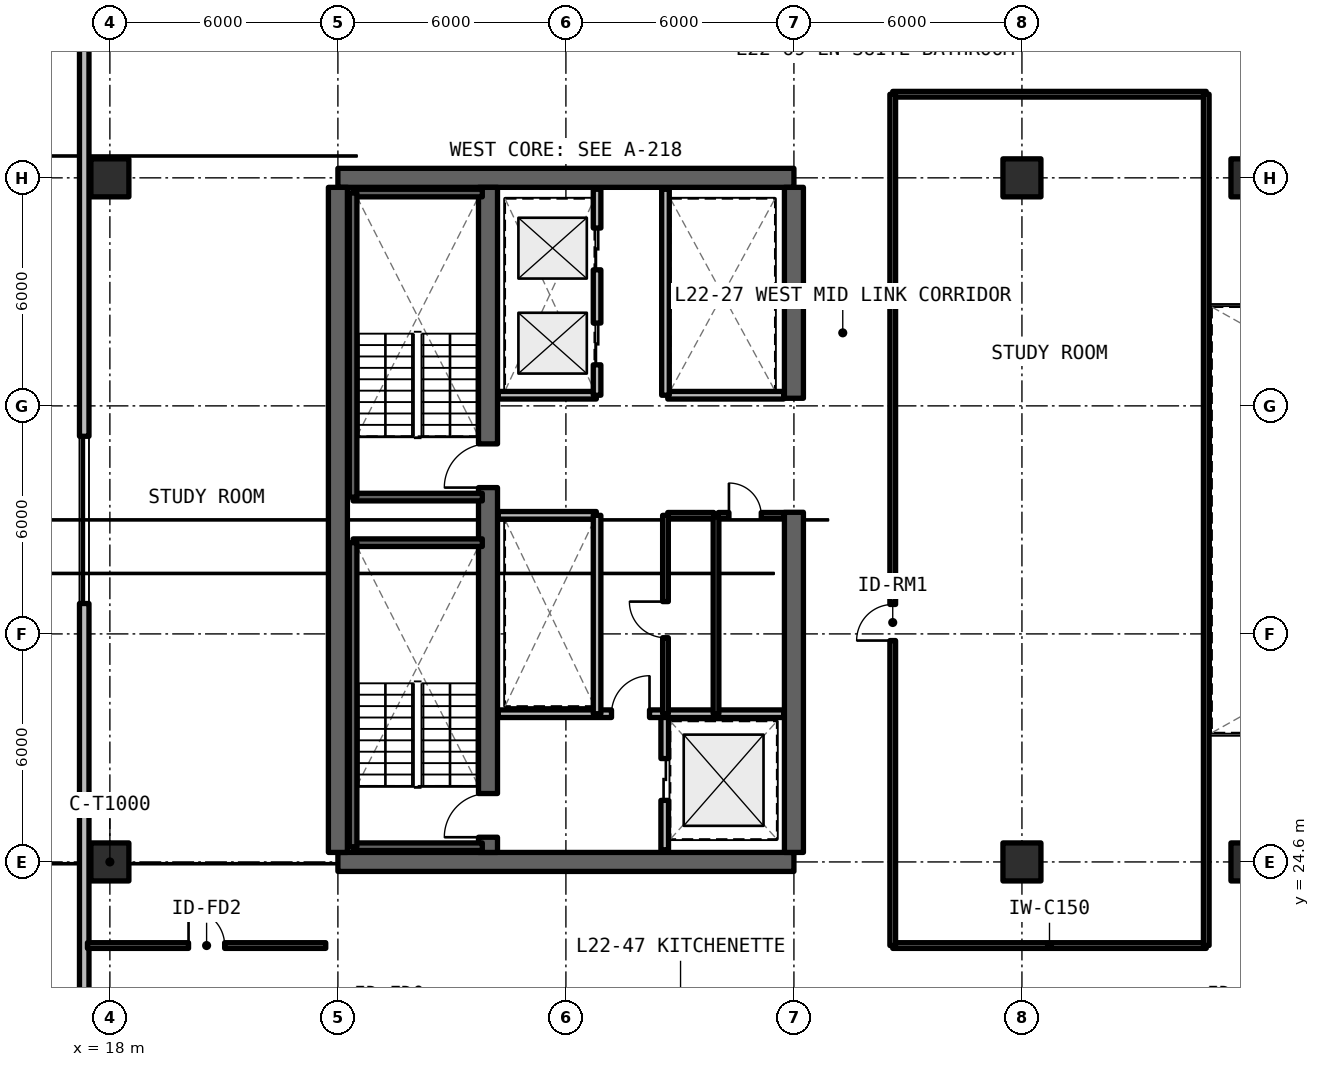
"""IFC4 building model, lengths in metres.
Left out: names, types, materials, properties, quantities, classifications, styles, units other than length and angle.
Written with IfcOpenShell. Run it as: python <this file> out.ifc"""

import sys

from ifc_helpers import new_model, si_unit, direction, frame, frame_2d, origin, origin_2d, place, context, subcontext, project, spatial, rectangle, extrude, element, fill, save


model = new_model("IFC4")
c1 = context("Model", 3, precision=1e-05, world=origin(), true_north=direction((0.0, 1.0)))
c2 = subcontext(c1, "Body", "Model", "MODEL_VIEW")
j1 = project(units=[si_unit("LENGTHUNIT", "METRE"), si_unit("PLANEANGLEUNIT", "RADIAN")], contexts=[c1])
p1 = place(None, origin())
s1 = spatial("IfcSite", under=j1, at=p1, CompositionType="ELEMENT")
p2 = place(p1, origin())
s2 = spatial("IfcBuilding", under=s1, at=p2, CompositionType="ELEMENT")
p3 = place(p2, frame((0.0, 0.0, 82.17)))
s3 = spatial("IfcBuildingStorey", under=s2, at=p3, CompositionType="ELEMENT", Elevation=82.17)
for number, where, z_axis, x_axis in (
    (1, (24.0, 24.6, 0.0), (0.0, 0.0, 1.0), (1.0, 0.0, 0.0)),
    (2, (36.0, 42.6, 0.0), (0.0, 0.0, 1.0), (-1.0, 0.0, 0.0)),
):
    element("IfcWall", number, at=place(p3, frame(where, z_axis=z_axis, x_axis=x_axis)), inside=s3, PredefinedType="SHEAR", context=c2, shape_type="SweptSolid", body=[
        extrude(rectangle(XDim=12.0, YDim=0.5, at=frame_2d((6.0, 0.0))), origin(), (0.0, 0.0, 1.0), 3.3),
    ])
p4 = place(p3, frame((24.0, 24.85, 0.0), z_axis=(0.0, 0.0, 1.0), x_axis=(0.0, 1.0, 0.0)))
e3 = element("IfcWall", 3, at=p4, inside=s3, PredefinedType="SHEAR", context=c2, shape_type="SweptSolid", body=[
    extrude(rectangle(XDim=17.5, YDim=0.5, at=frame_2d((8.75, 0.0))), origin(), (0.0, 0.0, 1.0), 3.3),
])
p5 = place(p3, frame((36.0, 24.85, 0.0), z_axis=(0.0, 0.0, 1.0), x_axis=(0.0, 1.0, 0.0)))
e4 = element("IfcWall", 4, at=p5, inside=s3, PredefinedType="SHEAR", context=c2, shape_type="SweptSolid", body=[
    extrude(rectangle(XDim=8.95, YDim=0.5, at=frame_2d((4.475, 0.0))), origin(), (0.0, 0.0, 1.0), 3.3),
])
p6 = place(p3, frame((36.0, 36.8, 0.0), z_axis=(0.0, 0.0, 1.0), x_axis=(0.0, 1.0, 0.0)))
e5 = element("IfcWall", 5, at=p6, inside=s3, PredefinedType="SHEAR", context=c2, shape_type="SweptSolid", body=[
    extrude(rectangle(XDim=5.55, YDim=0.5, at=frame_2d((2.775, 0.0))), origin(), (0.0, 0.0, 1.0), 3.3),
])
p7 = place(p3, frame((27.95, 24.85, 0.0), z_axis=(0.0, 0.0, 1.0), x_axis=(0.0, 1.0, 0.0)))
e6 = element("IfcWall", 6, at=p7, inside=s3, PredefinedType="SHEAR", context=c2, shape_type="SweptSolid", body=[
    extrude(rectangle(XDim=17.5, YDim=0.5, at=frame_2d((8.75, 0.0))), origin(), (0.0, 0.0, 1.0), 3.3),
])
p8 = place(p7, frame((0.4, 0.0, 0.0)))
e7 = element("IfcOpeningElement", 7, at=p8, cuts=e6, PredefinedType="OPENING", context=c2, shape_type="SweptSolid", body=[
    extrude(rectangle(XDim=1.15, YDim=2.15, at=frame_2d((0.575, 1.075))), frame((0.0, 0.26, 0.0), z_axis=(0.0, -1.0, 0.0), x_axis=(1.0, 0.0, 0.0)), (0.0, 0.0, 1.0), 0.52),
])
p9 = place(p7, frame((9.6, 0.0, 0.0)))
e8 = element("IfcOpeningElement", 8, at=p9, cuts=e6, PredefinedType="OPENING", context=c2, shape_type="SweptSolid", body=[
    extrude(rectangle(XDim=1.15, YDim=2.15, at=frame_2d((0.575, 1.075))), frame((0.0, 0.26, 0.0), z_axis=(0.0, -1.0, 0.0), x_axis=(1.0, 0.0, 0.0)), (0.0, 0.0, 1.0), 0.52),
])
for number, where, z_axis, x_axis in (
    (9, (18.0, 24.6, 0.0), (0.0, 0.0, 1.0), (1.0, 0.0, 0.0)),
    (10, (18.0, 42.6, 0.0), (0.0, 0.0, 1.0), (1.0, 0.0, 0.0)),
    (11, (42.0, 24.6, 0.0), (0.0, 0.0, 1.0), (1.0, 0.0, 0.0)),
    (12, (42.0, 42.6, 0.0), (0.0, 0.0, 1.0), (1.0, 0.0, 0.0)),
    (13, (48.0, 24.6, 0.0), (0.0, 0.0, 1.0), (1.0, 0.0, 0.0)),
    (14, (48.0, 42.6, 0.0), (0.0, 0.0, 1.0), (1.0, 0.0, 0.0)),
):
    element("IfcColumn", number, at=place(p3, frame(where, z_axis=z_axis, x_axis=x_axis)), inside=s3, PredefinedType="COLUMN", context=c2, shape_type="SweptSolid", body=[
        extrude(rectangle(XDim=1.0, YDim=1.0, at=origin_2d()), origin(), (0.0, 0.0, 1.0), 3.3),
    ])
p10 = place(p3, frame((17.325, 53.348, 0.0), z_axis=(0.0, 0.0, 1.0), x_axis=(0.0, -1.0, 0.0)))
e15 = element("IfcWall", 15, at=p10, inside=s3, PredefinedType="SOLIDWALL", context=c2, shape_type="SweptSolid", body=[
    extrude(rectangle(XDim=39.496, YDim=0.25, at=frame_2d((19.748, 0.0))), origin(), (0.0, 0.0, 1.0), 3.08),
])
p11 = place(p10, frame((1.698, 0.0, 0.0)))
e16 = element("IfcOpeningElement", 16, at=p11, cuts=e15, PredefinedType="OPENING", context=c2, shape_type="SweptSolid", body=[
    extrude(rectangle(XDim=1.1, YDim=2.15, at=frame_2d((0.55, 1.075))), frame((0.0, 0.135, 0.0), z_axis=(0.0, -1.0, 0.0), x_axis=(1.0, 0.0, 0.0)), (0.0, 0.0, 1.0), 0.27),
])
p12 = place(p10, frame((17.548, 0.0, 0.78)))
e17 = element("IfcOpeningElement", 17, at=p12, cuts=e15, PredefinedType="OPENING", context=c2, shape_type="SweptSolid", body=[
    extrude(rectangle(XDim=4.4, YDim=1.66, at=frame_2d((2.2, 0.83))), frame((0.0, 0.135, 0.0), z_axis=(0.0, -1.0, 0.0), x_axis=(1.0, 0.0, 0.0)), (0.0, 0.0, 1.0), 0.27),
])
p13 = place(p10, frame((35.642, 0.0, 0.78)))
e18 = element("IfcOpeningElement", 18, at=p13, cuts=e15, PredefinedType="OPENING", context=c2, shape_type="SweptSolid", body=[
    extrude(rectangle(XDim=1.4, YDim=1.65, at=frame_2d((0.7, 0.825))), frame((0.0, 0.135, 0.0), z_axis=(0.0, -1.0, 0.0), x_axis=(1.0, 0.0, 0.0)), (0.0, 0.0, 1.0), 0.27),
])
p14 = place(p3, frame((32.6, 24.92, 0.0), z_axis=(0.0, 0.0, 1.0), x_axis=(0.0, 1.0, 0.0)))
e19 = element("IfcWall", 19, at=p14, inside=s3, PredefinedType="SOLIDWALL", context=c2, shape_type="SweptSolid", body=[
    extrude(rectangle(XDim=3.58, YDim=0.2, at=frame_2d((1.79, 0.0))), origin(), (0.0, 0.0, 1.0), 2.35),
])
p15 = place(p14, frame((1.3, 0.0, 0.0)))
e20 = element("IfcOpeningElement", 20, at=p15, cuts=e19, PredefinedType="OPENING", context=c2, shape_type="SweptSolid", body=[
    extrude(rectangle(XDim=1.1, YDim=2.2, at=frame_2d((0.55, 1.1))), frame((0.0, 0.11, 0.0), z_axis=(0.0, -1.0, 0.0), x_axis=(1.0, 0.0, 0.0)), (0.0, 0.0, 1.0), 0.22),
])
p16 = place(p3, frame((28.22, 28.5, 0.0), z_axis=(0.0, 0.0, 1.0), x_axis=(1.0, 0.0, 0.0)))
e21 = element("IfcWall", 21, at=p16, inside=s3, PredefinedType="SOLIDWALL", context=c2, shape_type="SweptSolid", body=[
    extrude(rectangle(XDim=7.51, YDim=0.2, at=frame_2d((3.755, 0.0))), origin(), (0.0, 0.0, 1.0), 2.35),
])
p17 = place(p16, frame((2.98, 0.0, 0.0)))
e22 = element("IfcOpeningElement", 22, at=p17, cuts=e21, PredefinedType="OPENING", context=c2, shape_type="SweptSolid", body=[
    extrude(rectangle(XDim=1.0, YDim=2.15, at=frame_2d((0.5, 1.075))), frame((0.0, 0.11, 0.0), z_axis=(0.0, -1.0, 0.0), x_axis=(1.0, 0.0, 0.0)), (0.0, 0.0, 1.0), 0.22),
])
p18 = place(p3, frame((28.22, 33.72, 0.0), z_axis=(0.0, 0.0, 1.0), x_axis=(1.0, 0.0, 0.0)))
e23 = element("IfcWall", 23, at=p18, inside=s3, PredefinedType="SOLIDWALL", context=c2, shape_type="SweptSolid", body=[
    extrude(rectangle(XDim=2.58, YDim=0.2, at=frame_2d((1.29, 0.0))), origin(), (0.0, 0.0, 1.0), 2.35),
])
p19 = place(p3, frame((30.82, 28.5, 0.0), z_axis=(0.0, 0.0, 1.0), x_axis=(0.0, 1.0, 0.0)))
e24 = element("IfcWall", 24, at=p19, inside=s3, PredefinedType="SOLIDWALL", context=c2, shape_type="SweptSolid", body=[
    extrude(rectangle(XDim=5.22, YDim=0.2, at=frame_2d((2.61, 0.0))), origin(), (0.0, 0.0, 1.0), 2.35),
])
p20 = place(p3, frame((33.95, 28.5, 0.0), z_axis=(0.0, 0.0, 1.0), x_axis=(0.0, 1.0, 0.0)))
e25 = element("IfcWall", 25, at=p20, inside=s3, PredefinedType="SOLIDWALL", context=c2, shape_type="SweptSolid", body=[
    extrude(rectangle(XDim=5.22, YDim=0.15, at=frame_2d((2.61, 0.0))), origin(), (0.0, 0.0, 1.0), 2.35),
])
p21 = place(p3, frame((32.68, 33.72, 0.0), z_axis=(0.0, 0.0, 1.0), x_axis=(1.0, 0.0, 0.0)))
e26 = element("IfcWall", 26, at=p21, inside=s3, PredefinedType="SOLIDWALL", context=c2, shape_type="SweptSolid", body=[
    extrude(rectangle(XDim=1.21, YDim=0.15, at=frame_2d((0.605, 0.0))), origin(), (0.0, 0.0, 1.0), 2.35),
])
p22 = place(p3, frame((34.01, 33.72, 0.0), z_axis=(0.0, 0.0, 1.0), x_axis=(1.0, 0.0, 0.0)))
e27 = element("IfcWall", 27, at=p22, inside=s3, PredefinedType="SOLIDWALL", context=c2, shape_type="SweptSolid", body=[
    extrude(rectangle(XDim=1.72, YDim=0.15, at=frame_2d((0.86, 0.0))), origin(), (0.0, 0.0, 1.0), 2.35),
])
p23 = place(p22, frame((0.28, 0.0, 0.0)))
e28 = element("IfcOpeningElement", 28, at=p23, cuts=e27, PredefinedType="OPENING", context=c2, shape_type="SweptSolid", body=[
    extrude(rectangle(XDim=0.85, YDim=2.1, at=frame_2d((0.425, 1.05))), frame((0.0, 0.085, 0.0), z_axis=(0.0, -1.0, 0.0), x_axis=(1.0, 0.0, 0.0)), (0.0, 0.0, 1.0), 0.17),
])
p24 = place(p3, frame((32.62, 28.5, 0.0), z_axis=(0.0, 0.0, 1.0), x_axis=(0.0, 1.0, 0.0)))
e29 = element("IfcWall", 29, at=p24, inside=s3, PredefinedType="SOLIDWALL", context=c2, shape_type="SweptSolid", body=[
    extrude(rectangle(XDim=5.22, YDim=0.15, at=frame_2d((2.61, 0.0))), origin(), (0.0, 0.0, 1.0), 2.35),
])
p25 = place(p24, frame((2.0, 0.0, 0.0)))
e30 = element("IfcOpeningElement", 30, at=p25, cuts=e29, PredefinedType="OPENING", context=c2, shape_type="SweptSolid", body=[
    extrude(rectangle(XDim=0.95, YDim=2.15, at=frame_2d((0.475, 1.075))), frame((0.0, 0.085, 0.0), z_axis=(0.0, -1.0, 0.0), x_axis=(1.0, 0.0, 0.0)), (0.0, 0.0, 1.0), 0.17),
])
p26 = place(p3, frame((28.22, 36.88, 0.0), z_axis=(0.0, 0.0, 1.0), x_axis=(1.0, 0.0, 0.0)))
e31 = element("IfcWall", 31, at=p26, inside=s3, PredefinedType="SOLIDWALL", context=c2, shape_type="SweptSolid", body=[
    extrude(rectangle(XDim=2.58, YDim=0.2, at=frame_2d((1.29, 0.0))), origin(), (0.0, 0.0, 1.0), 2.35),
])
p27 = place(p3, frame((30.82, 36.88, 0.0), z_axis=(0.0, 0.0, 1.0), x_axis=(0.0, 1.0, 0.0)))
e32 = element("IfcWall", 32, at=p27, inside=s3, PredefinedType="SOLIDWALL", context=c2, shape_type="SweptSolid", body=[
    extrude(rectangle(XDim=5.42, YDim=0.2, at=frame_2d((2.71, 0.0))), origin(), (0.0, 0.0, 1.0), 2.35),
])
p28 = place(p27, frame((0.8, 0.0, 0.0)))
e33 = element("IfcOpeningElement", 33, at=p28, cuts=e32, PredefinedType="OPENING", context=c2, shape_type="SweptSolid", body=[
    extrude(rectangle(XDim=1.1, YDim=2.2, at=frame_2d((0.55, 1.1))), frame((0.0, 0.11, 0.0), z_axis=(0.0, -1.0, 0.0), x_axis=(1.0, 0.0, 0.0)), (0.0, 0.0, 1.0), 0.22),
])
p29 = place(p27, frame((3.3, 0.0, 0.0)))
e34 = element("IfcOpeningElement", 34, at=p29, cuts=e32, PredefinedType="OPENING", context=c2, shape_type="SweptSolid", body=[
    extrude(rectangle(XDim=1.1, YDim=2.2, at=frame_2d((0.55, 1.1))), frame((0.0, 0.11, 0.0), z_axis=(0.0, -1.0, 0.0), x_axis=(1.0, 0.0, 0.0)), (0.0, 0.0, 1.0), 0.22),
])
p30 = place(p3, frame((32.68, 36.88, 0.0), z_axis=(0.0, 0.0, 1.0), x_axis=(1.0, 0.0, 0.0)))
e35 = element("IfcWall", 35, at=p30, inside=s3, PredefinedType="SOLIDWALL", context=c2, shape_type="SweptSolid", body=[
    extrude(rectangle(XDim=3.05, YDim=0.2, at=frame_2d((1.525, 0.0))), origin(), (0.0, 0.0, 1.0), 2.35),
])
p31 = place(p3, frame((32.62, 36.88, 0.0), z_axis=(0.0, 0.0, 1.0), x_axis=(0.0, 1.0, 0.0)))
e36 = element("IfcWall", 36, at=p31, inside=s3, PredefinedType="SOLIDWALL", context=c2, shape_type="SweptSolid", body=[
    extrude(rectangle(XDim=5.42, YDim=0.2, at=frame_2d((2.71, 0.0))), origin(), (0.0, 0.0, 1.0), 2.35),
])
for number, where, z_axis, x_axis in (
    (37, (38.6, 22.4, 0.0), (0.0, 0.0, 1.0), (1.0, 0.0, 0.0)),
    (38, (38.6, 44.8, 0.0), (0.0, 0.0, 1.0), (1.0, 0.0, 0.0)),
):
    element("IfcWall", number, at=place(p3, frame(where, z_axis=z_axis, x_axis=x_axis)), inside=s3, PredefinedType="SOLIDWALL", context=c2, shape_type="SweptSolid", body=[
        extrude(rectangle(XDim=8.25, YDim=0.15, at=frame_2d((4.125, 0.0))), origin(), (0.0, 0.0, 1.0), 2.35),
    ])
p32 = place(p3, frame((38.6, 22.4, 0.0), z_axis=(0.0, 0.0, 1.0), x_axis=(0.0, 1.0, 0.0)))
e39 = element("IfcWall", 39, at=p32, inside=s3, PredefinedType="SOLIDWALL", context=c2, shape_type="SweptSolid", body=[
    extrude(rectangle(XDim=22.4, YDim=0.15, at=frame_2d((11.2, 0.0))), origin(), (0.0, 0.0, 1.0), 2.35),
])
p33 = place(p32, frame((8.025, 0.0, 0.0)))
e40 = element("IfcOpeningElement", 40, at=p33, cuts=e39, PredefinedType="OPENING", context=c2, shape_type="SweptSolid", body=[
    extrude(rectangle(XDim=0.95, YDim=2.15, at=frame_2d((0.475, 1.075))), frame((0.0, 0.085, 0.0), z_axis=(0.0, -1.0, 0.0), x_axis=(1.0, 0.0, 0.0)), (0.0, 0.0, 1.0), 0.17),
])
p34 = place(p3, frame((46.85, 22.4, 0.0), z_axis=(0.0, 0.0, 1.0), x_axis=(0.0, 1.0, 0.0)))
e41 = element("IfcWall", 41, at=p34, inside=s3, PredefinedType="SOLIDWALL", context=c2, shape_type="SweptSolid", body=[
    extrude(rectangle(XDim=22.4, YDim=0.15, at=frame_2d((11.2, 0.0))), origin(), (0.0, 0.0, 1.0), 2.35),
])
p35 = place(p3, frame((17.41, 22.4, 0.0), z_axis=(0.0, 0.0, 1.0), x_axis=(1.0, 0.0, 0.0)))
e42 = element("IfcWall", 42, at=p35, inside=s3, PredefinedType="SOLIDWALL", context=c2, shape_type="SweptSolid", body=[
    extrude(rectangle(XDim=6.27, YDim=0.15, at=frame_2d((3.135, 0.0))), origin(), (0.0, 0.0, 1.0), 2.35),
])
p36 = place(p35, frame((2.66, 0.0, 0.0)))
e43 = element("IfcOpeningElement", 43, at=p36, cuts=e42, PredefinedType="OPENING", context=c2, shape_type="SweptSolid", body=[
    extrude(rectangle(XDim=0.95, YDim=2.15, at=frame_2d((0.475, 1.075))), frame((0.0, 0.085, 0.0), z_axis=(0.0, -1.0, 0.0), x_axis=(1.0, 0.0, 0.0)), (0.0, 0.0, 1.0), 0.17),
])
for number, where, z_axis, x_axis in (
    (44, (24.4, 25.0, 0.0), (0.0, 0.0, 1.0), (1.0, 0.0, 0.0)),
    (45, (27.8, 33.0, 0.0), (0.0, 0.0, 1.0), (-1.0, 0.0, 0.0)),
):
    element("IfcWall", number, at=place(p3, frame(where, z_axis=z_axis, x_axis=x_axis)), inside=s3, PredefinedType="SOLIDWALL", context=c2, shape_type="SweptSolid", body=[
        extrude(rectangle(XDim=3.4, YDim=0.2, at=frame_2d((1.7, 0.0))), origin(), (0.0, 0.0, 1.0), 3.3),
    ])
p37 = place(p3, frame((24.4, 33.0, 0.0), z_axis=(0.0, 0.0, 1.0), x_axis=(0.0, -1.0, 0.0)))
e46 = element("IfcWall", 46, at=p37, inside=s3, PredefinedType="SOLIDWALL", context=c2, shape_type="SweptSolid", body=[
    extrude(rectangle(XDim=8.0, YDim=0.2, at=frame_2d((4.0, 0.0))), origin(), (0.0, 0.0, 1.0), 3.3),
])
for number, where, z_axis, x_axis in (
    (47, (24.4, 34.2, 0.0), (0.0, 0.0, 1.0), (1.0, 0.0, 0.0)),
    (48, (27.8, 42.2, 0.0), (0.0, 0.0, 1.0), (-1.0, 0.0, 0.0)),
):
    element("IfcWall", number, at=place(p3, frame(where, z_axis=z_axis, x_axis=x_axis)), inside=s3, PredefinedType="SOLIDWALL", context=c2, shape_type="SweptSolid", body=[
        extrude(rectangle(XDim=3.4, YDim=0.2, at=frame_2d((1.7, 0.0))), origin(), (0.0, 0.0, 1.0), 3.3),
    ])
p38 = place(p3, frame((24.4, 42.2, 0.0), z_axis=(0.0, 0.0, 1.0), x_axis=(0.0, -1.0, 0.0)))
e49 = element("IfcWall", 49, at=p38, inside=s3, PredefinedType="SOLIDWALL", context=c2, shape_type="SweptSolid", body=[
    extrude(rectangle(XDim=8.0, YDim=0.2, at=frame_2d((4.0, 0.0))), origin(), (0.0, 0.0, 1.0), 3.3),
])
p39 = place(p12, origin())
e50 = element("IfcWindow", 50, at=p39, inside=s3, PartitioningType="SINGLE_PANEL", PredefinedType="WINDOW", context=c2, shape_type="SweptSolid", body=[
    extrude(rectangle(XDim=4.4, YDim=1.66, at=frame_2d((2.2, 0.83))), frame((0.0, 0.03, 0.0), z_axis=(0.0, -1.0, 0.0), x_axis=(1.0, 0.0, 0.0)), (0.0, 0.0, 1.0), 0.06),
])
fill(e17, e50)
p40 = place(p15, origin())
e51 = element("IfcDoor", 51, at=p40, inside=s3, OperationType="SLIDING_TO_LEFT", PredefinedType="DOOR", context=c2, shape_type="SweptSolid", body=[
    extrude(rectangle(XDim=1.1, YDim=2.2, at=frame_2d((0.55, 1.1))), frame((0.0, 0.025, 0.0), z_axis=(0.0, -1.0, 0.0), x_axis=(1.0, 0.0, 0.0)), (0.0, 0.0, 1.0), 0.05),
])
fill(e20, e51)
p41 = place(p17, origin())
e52 = element("IfcDoor", 52, at=p41, inside=s3, OperationType="SINGLE_SWING_RIGHT", PredefinedType="DOOR", context=c2, shape_type="SweptSolid", body=[
    extrude(rectangle(XDim=1.0, YDim=2.15, at=frame_2d((0.5, 1.075))), frame((0.0, 0.025, 0.0), z_axis=(0.0, -1.0, 0.0), x_axis=(1.0, 0.0, 0.0)), (0.0, 0.0, 1.0), 0.05),
])
fill(e22, e52)
p42 = place(p23, origin())
e53 = element("IfcDoor", 53, at=p42, inside=s3, OperationType="SINGLE_SWING_LEFT", PredefinedType="DOOR", context=c2, shape_type="SweptSolid", body=[
    extrude(rectangle(XDim=0.85, YDim=2.1, at=frame_2d((0.425, 1.05))), frame((0.0, 0.025, 0.0), z_axis=(0.0, -1.0, 0.0), x_axis=(1.0, 0.0, 0.0)), (0.0, 0.0, 1.0), 0.05),
])
fill(e28, e53)
p43 = place(p25, origin())
e54 = element("IfcDoor", 54, at=p43, inside=s3, OperationType="SINGLE_SWING_RIGHT", PredefinedType="DOOR", context=c2, shape_type="SweptSolid", body=[
    extrude(rectangle(XDim=0.95, YDim=2.15, at=frame_2d((0.475, 1.075))), frame((0.0, 0.025, 0.0), z_axis=(0.0, -1.0, 0.0), x_axis=(1.0, 0.0, 0.0)), (0.0, 0.0, 1.0), 0.05),
])
fill(e30, e54)
p44 = place(p28, origin())
e55 = element("IfcDoor", 55, at=p44, inside=s3, OperationType="SLIDING_TO_LEFT", PredefinedType="DOOR", context=c2, shape_type="SweptSolid", body=[
    extrude(rectangle(XDim=1.1, YDim=2.2, at=frame_2d((0.55, 1.1))), frame((0.0, 0.025, 0.0), z_axis=(0.0, -1.0, 0.0), x_axis=(1.0, 0.0, 0.0)), (0.0, 0.0, 1.0), 0.05),
])
fill(e33, e55)
p45 = place(p29, origin())
e56 = element("IfcDoor", 56, at=p45, inside=s3, OperationType="SLIDING_TO_RIGHT", PredefinedType="DOOR", context=c2, shape_type="SweptSolid", body=[
    extrude(rectangle(XDim=1.1, YDim=2.2, at=frame_2d((0.55, 1.1))), frame((0.0, 0.025, 0.0), z_axis=(0.0, -1.0, 0.0), x_axis=(1.0, 0.0, 0.0)), (0.0, 0.0, 1.0), 0.05),
])
fill(e34, e56)
p46 = place(p33, origin())
e57 = element("IfcDoor", 57, at=p46, inside=s3, OperationType="SINGLE_SWING_LEFT", PredefinedType="DOOR", context=c2, shape_type="SweptSolid", body=[
    extrude(rectangle(XDim=0.95, YDim=2.15, at=frame_2d((0.475, 1.075))), frame((0.0, 0.025, 0.0), z_axis=(0.0, -1.0, 0.0), x_axis=(1.0, 0.0, 0.0)), (0.0, 0.0, 1.0), 0.05),
])
fill(e40, e57)
p47 = place(p36, origin())
e58 = element("IfcDoor", 58, at=p47, inside=s3, OperationType="SINGLE_SWING_LEFT", PredefinedType="DOOR", context=c2, shape_type="SweptSolid", body=[
    extrude(rectangle(XDim=0.95, YDim=2.15, at=frame_2d((0.475, 1.075))), frame((0.0, 0.025, 0.0), z_axis=(0.0, -1.0, 0.0), x_axis=(1.0, 0.0, 0.0)), (0.0, 0.0, 1.0), 0.05),
])
fill(e43, e58)
p48 = place(p8, origin())
e59 = element("IfcDoor", 59, at=p48, inside=s3, OperationType="SINGLE_SWING_LEFT", PredefinedType="DOOR", context=c2, shape_type="SweptSolid", body=[
    extrude(rectangle(XDim=1.15, YDim=2.15, at=frame_2d((0.575, 1.075))), frame((0.0, 0.025, 0.0), z_axis=(0.0, -1.0, 0.0), x_axis=(1.0, 0.0, 0.0)), (0.0, 0.0, 1.0), 0.05),
])
fill(e7, e59)
p49 = place(p9, origin())
e60 = element("IfcDoor", 60, at=p49, inside=s3, OperationType="SINGLE_SWING_RIGHT", PredefinedType="DOOR", context=c2, shape_type="SweptSolid", body=[
    extrude(rectangle(XDim=1.15, YDim=2.15, at=frame_2d((0.575, 1.075))), frame((0.0, 0.025, 0.0), z_axis=(0.0, -1.0, 0.0), x_axis=(1.0, 0.0, 0.0)), (0.0, 0.0, 1.0), 0.05),
])
fill(e8, e60)
save(model, sys.argv[1])
